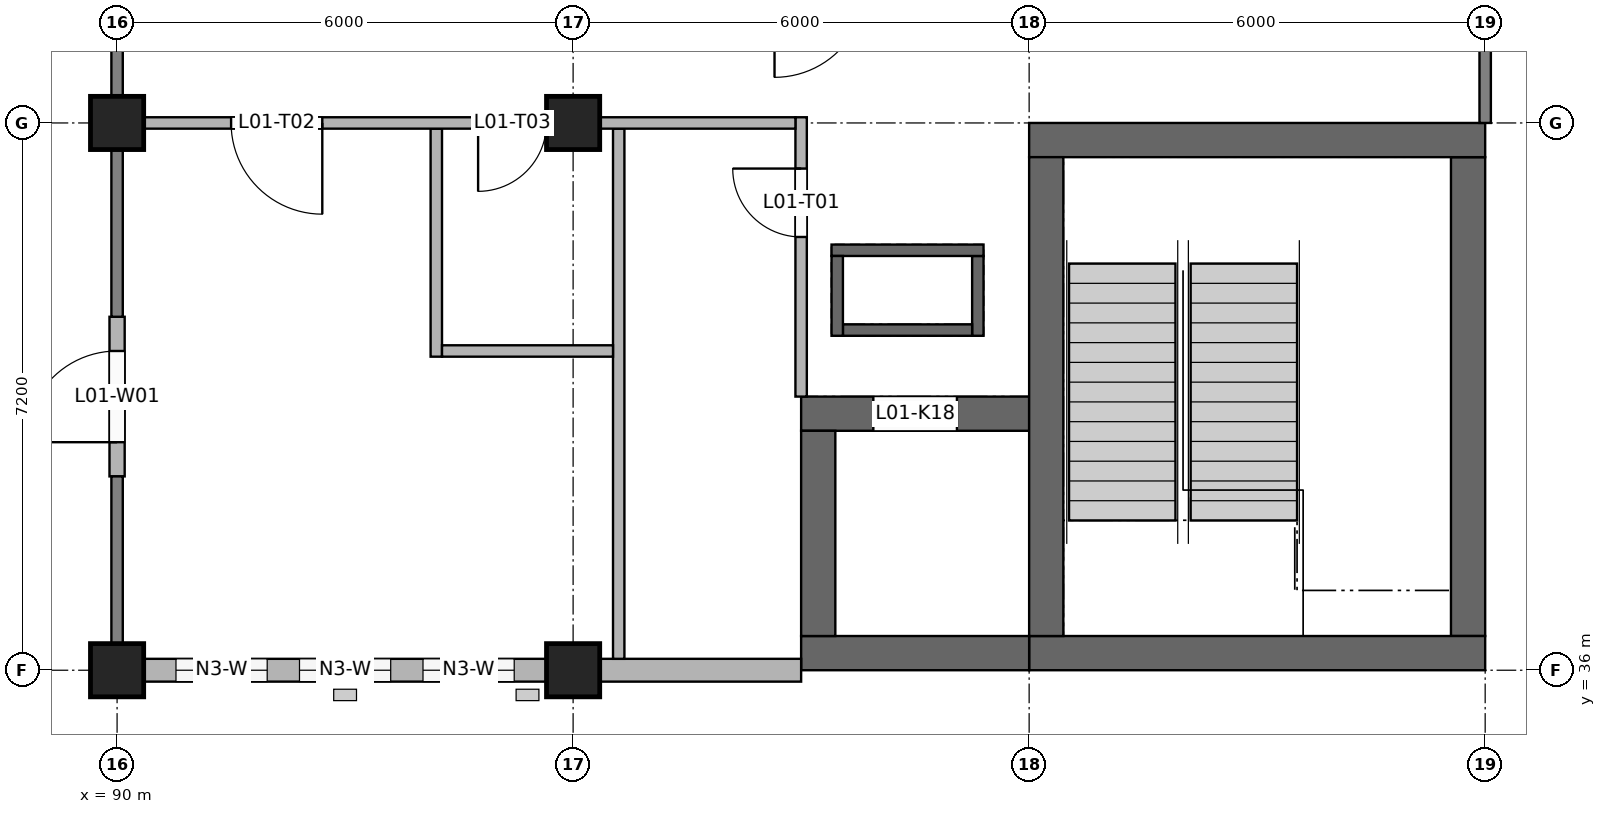
"""IFC4 building model, lengths in metres.
Left out: names, types, materials, properties, quantities, classifications, styles, units other than length and angle.
Written with IfcOpenShell. Run it as: python <this file> out.ifc"""

import sys

from ifc_helpers import new_model, si_unit, direction, frame, frame_2d, origin, origin_2d, place, context, subcontext, project, spatial, rectangle, extrude, element, fill, save


model = new_model("IFC4")
c1 = context("Model", 3, precision=1e-05, world=origin(), true_north=direction((0.0, 1.0)))
c2 = subcontext(c1, "Body", "Model", "MODEL_VIEW")
j1 = project(units=[si_unit("LENGTHUNIT", "METRE"), si_unit("PLANEANGLEUNIT", "RADIAN")], contexts=[c1])
p1 = place(None, origin())
s1 = spatial("IfcSite", under=j1, at=p1, CompositionType="ELEMENT")
p2 = place(p1, origin())
s2 = spatial("IfcBuilding", under=s1, at=p2, CompositionType="ELEMENT")
p3 = place(p2, frame((0.0, 0.0, 4.2)))
s3 = spatial("IfcBuildingStorey", under=s2, at=p3, CompositionType="ELEMENT", Elevation=4.2)
p4 = place(p3, frame((102.0, 36.225, 0.0), z_axis=(0.0, 0.0, 1.0), x_axis=(1.0, 0.0, 0.0)))
e1 = element("IfcWall", 1, at=p4, inside=s3, PredefinedType="SHEAR", context=c2, shape_type="SweptSolid", body=[
    extrude(rectangle(XDim=6.0, YDim=0.45, at=frame_2d((3.0, 0.0))), origin(), (0.0, 0.0, 1.0), 3.95),
])
p5 = place(p3, frame((102.0, 42.975, 0.0), z_axis=(0.0, 0.0, 1.0), x_axis=(1.0, 0.0, 0.0)))
e2 = element("IfcWall", 2, at=p5, inside=s3, PredefinedType="SHEAR", context=c2, shape_type="SweptSolid", body=[
    extrude(rectangle(XDim=6.0, YDim=0.45, at=frame_2d((3.0, 0.0))), origin(), (0.0, 0.0, 1.0), 3.95),
])
p6 = place(p5, frame((2.4, 0.0, 0.0)))
e3 = element("IfcOpeningElement", 3, at=p6, cuts=e2, PredefinedType="OPENING", context=c2, shape_type="SweptSolid", body=[
    extrude(rectangle(XDim=1.2, YDim=2.1, at=frame_2d((0.6, 1.05))), frame((0.0, 0.235, 0.0), z_axis=(0.0, -1.0, 0.0), x_axis=(1.0, 0.0, 0.0)), (0.0, 0.0, 1.0), 0.47),
])
p7 = place(p3, frame((102.225, 36.45, 0.0), z_axis=(0.0, 0.0, 1.0), x_axis=(0.0, 1.0, 0.0)))
e4 = element("IfcWall", 4, at=p7, inside=s3, PredefinedType="SHEAR", context=c2, shape_type="SweptSolid", body=[
    extrude(rectangle(XDim=6.3, YDim=0.45, at=frame_2d((3.15, 0.0))), origin(), (0.0, 0.0, 1.0), 3.95),
])
p8 = place(p3, frame((107.775, 36.45, 0.0), z_axis=(0.0, 0.0, 1.0), x_axis=(0.0, 1.0, 0.0)))
e5 = element("IfcWall", 5, at=p8, inside=s3, PredefinedType="SHEAR", context=c2, shape_type="SweptSolid", body=[
    extrude(rectangle(XDim=6.3, YDim=0.45, at=frame_2d((3.15, 0.0))), origin(), (0.0, 0.0, 1.0), 3.95),
])
p9 = place(p8, frame((1.65, 0.0, 0.0)))
e6 = element("IfcOpeningElement", 6, at=p9, cuts=e5, PredefinedType="OPENING", context=c2, shape_type="SweptSolid", body=[
    extrude(rectangle(XDim=1.4, YDim=2.1, at=frame_2d((0.7, 1.05))), frame((0.0, 0.235, 0.0), z_axis=(0.0, -1.0, 0.0), x_axis=(1.0, 0.0, 0.0)), (0.0, 0.0, 1.0), 0.47),
])
p10 = place(p3, frame((99.0, 36.225, 0.0), z_axis=(0.0, 0.0, 1.0), x_axis=(1.0, 0.0, 0.0)))
e7 = element("IfcWall", 7, at=p10, inside=s3, PredefinedType="SHEAR", context=c2, shape_type="SweptSolid", body=[
    extrude(rectangle(XDim=3.0, YDim=0.45, at=frame_2d((1.5, 0.0))), origin(), (0.0, 0.0, 1.0), 4.2),
])
p11 = place(p3, frame((99.0, 39.375, 0.0), z_axis=(0.0, 0.0, 1.0), x_axis=(1.0, 0.0, 0.0)))
e8 = element("IfcWall", 8, at=p11, inside=s3, PredefinedType="SHEAR", context=c2, shape_type="SweptSolid", body=[
    extrude(rectangle(XDim=3.0, YDim=0.45, at=frame_2d((1.5, 0.0))), origin(), (0.0, 0.0, 1.0), 4.2),
])
p12 = place(p11, frame((0.95, 0.0, 0.0)))
e9 = element("IfcOpeningElement", 9, at=p12, cuts=e8, PredefinedType="OPENING", context=c2, shape_type="SweptSolid", body=[
    extrude(rectangle(XDim=1.1, YDim=2.1, at=frame_2d((0.55, 1.05))), frame((0.0, 0.235, 0.0), z_axis=(0.0, -1.0, 0.0), x_axis=(1.0, 0.0, 0.0)), (0.0, 0.0, 1.0), 0.47),
])
p13 = place(p3, frame((99.225, 36.45, 0.0), z_axis=(0.0, 0.0, 1.0), x_axis=(0.0, 1.0, 0.0)))
e10 = element("IfcWall", 10, at=p13, inside=s3, PredefinedType="SHEAR", context=c2, shape_type="SweptSolid", body=[
    extrude(rectangle(XDim=2.7, YDim=0.45, at=frame_2d((1.35, 0.0))), origin(), (0.0, 0.0, 1.0), 4.2),
])
for number, where, z_axis, x_axis in (
    (11, (102.0, 36.225, -0.2), (0.0, 0.0, 1.0), (1.0, 0.0, 0.0)),
    (12, (102.0, 42.975, -0.2), (0.0, 0.0, 1.0), (1.0, 0.0, 0.0)),
):
    element("IfcWall", number, at=place(p3, frame(where, z_axis=z_axis, x_axis=x_axis)), inside=s3, PredefinedType="SOLIDWALL", context=c2, shape_type="SweptSolid", body=[
        extrude(rectangle(XDim=6.0, YDim=0.45, at=frame_2d((3.0, 0.0))), origin(), (0.0, 0.0, 1.0), 0.2),
    ])
p14 = place(p3, frame((107.775, 36.45, -0.2), z_axis=(0.0, 0.0, 1.0), x_axis=(0.0, 1.0, 0.0)))
e13 = element("IfcWall", 13, at=p14, inside=s3, PredefinedType="SOLIDWALL", context=c2, shape_type="SweptSolid", body=[
    extrude(rectangle(XDim=6.3, YDim=0.45, at=frame_2d((3.15, 0.0))), origin(), (0.0, 0.0, 1.0), 0.2),
])
p15 = place(p3, frame((99.4, 40.475, 0.0), z_axis=(0.0, 0.0, 1.0), x_axis=(1.0, 0.0, 0.0)))
e14 = element("IfcWall", 14, at=p15, inside=s3, PredefinedType="SOLIDWALL", context=c2, shape_type="SweptSolid", body=[
    extrude(rectangle(XDim=2.0, YDim=0.15, at=frame_2d((1.0, 0.0))), origin(), (0.0, 0.0, 1.0), 4.2),
])
p16 = place(p3, frame((99.4, 41.525, 0.0), z_axis=(0.0, 0.0, 1.0), x_axis=(1.0, 0.0, 0.0)))
e15 = element("IfcWall", 15, at=p16, inside=s3, PredefinedType="SOLIDWALL", context=c2, shape_type="SweptSolid", body=[
    extrude(rectangle(XDim=2.0, YDim=0.15, at=frame_2d((1.0, 0.0))), origin(), (0.0, 0.0, 1.0), 4.2),
])
p17 = place(p16, frame((0.6, 0.0, 0.0)))
e16 = element("IfcOpeningElement", 16, at=p17, cuts=e15, PredefinedType="OPENING", context=c2, shape_type="SweptSolid", body=[
    extrude(rectangle(XDim=0.8, YDim=2.1, at=frame_2d((0.4, 1.05))), frame((0.0, 0.085, 0.0), z_axis=(0.0, -1.0, 0.0), x_axis=(1.0, 0.0, 0.0)), (0.0, 0.0, 1.0), 0.17),
])
for number, where, z_axis, x_axis in (
    (17, (99.475, 40.55, 0.0), (0.0, 0.0, 1.0), (0.0, 1.0, 0.0)),
    (18, (101.325, 40.55, 0.0), (0.0, 0.0, 1.0), (0.0, 1.0, 0.0)),
):
    element("IfcWall", number, at=place(p3, frame(where, z_axis=z_axis, x_axis=x_axis)), inside=s3, PredefinedType="SOLIDWALL", context=c2, shape_type="SweptSolid", body=[
        extrude(rectangle(XDim=0.9, YDim=0.15, at=frame_2d((0.45, 0.0))), origin(), (0.0, 0.0, 1.0), 4.2),
    ])
p18 = place(p3, frame((99.55, 40.475, -0.2), z_axis=(0.0, 0.0, 1.0), x_axis=(1.0, 0.0, 0.0)))
e19 = element("IfcWall", 19, at=p18, inside=s3, PredefinedType="SOLIDWALL", context=c2, shape_type="SweptSolid", body=[
    extrude(rectangle(XDim=1.7, YDim=0.15, at=frame_2d((0.85, 0.0))), origin(), (0.0, 0.0, 1.0), 0.2),
])
p19 = place(p3, frame((99.4, 41.525, -0.2), z_axis=(0.0, 0.0, 1.0), x_axis=(1.0, 0.0, 0.0)))
e20 = element("IfcWall", 20, at=p19, inside=s3, PredefinedType="SOLIDWALL", context=c2, shape_type="SweptSolid", body=[
    extrude(rectangle(XDim=2.0, YDim=0.15, at=frame_2d((1.0, 0.0))), origin(), (0.0, 0.0, 1.0), 0.2),
])
for number, where, z_axis, x_axis in (
    (21, (99.475, 40.4, -0.2), (0.0, 0.0, 1.0), (0.0, 1.0, 0.0)),
    (22, (101.325, 40.4, -0.2), (0.0, 0.0, 1.0), (0.0, 1.0, 0.0)),
):
    element("IfcWall", number, at=place(p3, frame(where, z_axis=z_axis, x_axis=x_axis)), inside=s3, PredefinedType="SOLIDWALL", context=c2, shape_type="SweptSolid", body=[
        extrude(rectangle(XDim=1.05, YDim=0.15, at=frame_2d((0.525, 0.0))), origin(), (0.0, 0.0, 1.0), 0.2),
    ])
for number, where, z_axis, x_axis in (
    (23, (90.0, 36.0, 0.0), (0.0, 0.0, 1.0), (1.0, 0.0, 0.0)),
    (24, (96.0, 36.0, 0.0), (0.0, 0.0, 1.0), (1.0, 0.0, 0.0)),
    (25, (90.0, 43.2, 0.0), (0.0, 0.0, 1.0), (1.0, 0.0, 0.0)),
    (26, (96.0, 43.2, 0.0), (0.0, 0.0, 1.0), (1.0, 0.0, 0.0)),
):
    element("IfcColumn", number, at=place(p3, frame(where, z_axis=z_axis, x_axis=x_axis)), inside=s3, PredefinedType="COLUMN", context=c2, shape_type="SweptSolid", body=[
        extrude(rectangle(XDim=0.7, YDim=0.7, at=origin_2d()), origin(), (0.0, 0.0, 1.0), 3.95),
    ])
p20 = place(p3, frame((90.0, 38.55, 0.0), z_axis=(0.0, 0.0, 1.0), x_axis=(0.0, 1.0, 0.0)))
e27 = element("IfcWall", 27, at=p20, inside=s3, PredefinedType="SOLIDWALL", context=c2, shape_type="SweptSolid", body=[
    extrude(rectangle(XDim=2.1, YDim=0.2, at=frame_2d((1.05, 0.0))), origin(), (0.0, 0.0, 1.0), 3.15),
])
p21 = place(p20, frame((0.45, 0.0, 0.0)))
e28 = element("IfcOpeningElement", 28, at=p21, cuts=e27, PredefinedType="OPENING", context=c2, shape_type="SweptSolid", body=[
    extrude(rectangle(XDim=1.2, YDim=2.4, at=frame_2d((0.6, 1.2))), frame((0.0, 0.11, 0.0), z_axis=(0.0, -1.0, 0.0), x_axis=(1.0, 0.0, 0.0)), (0.0, 0.0, 1.0), 0.22),
])
p22 = place(p3, frame((90.35, 36.0, 0.0), z_axis=(0.0, 0.0, 1.0), x_axis=(1.0, 0.0, 0.0)))
e29 = element("IfcWall", 29, at=p22, inside=s3, PredefinedType="SOLIDWALL", context=c2, shape_type="SweptSolid", body=[
    extrude(rectangle(XDim=5.3, YDim=0.3, at=frame_2d((2.65, 0.0))), origin(), (0.0, 0.0, 1.0), 3.25),
])
p23 = place(p22, frame((0.425, 0.0, 0.9)))
e30 = element("IfcOpeningElement", 30, at=p23, cuts=e29, PredefinedType="OPENING", context=c2, shape_type="SweptSolid", body=[
    extrude(rectangle(XDim=1.2, YDim=1.5, at=frame_2d((0.6, 0.75))), frame((0.0, 0.16, 0.0), z_axis=(0.0, -1.0, 0.0), x_axis=(1.0, 0.0, 0.0)), (0.0, 0.0, 1.0), 0.32),
])
p24 = place(p22, frame((2.05, 0.0, 0.9)))
e31 = element("IfcOpeningElement", 31, at=p24, cuts=e29, PredefinedType="OPENING", context=c2, shape_type="SweptSolid", body=[
    extrude(rectangle(XDim=1.2, YDim=1.5, at=frame_2d((0.6, 0.75))), frame((0.0, 0.16, 0.0), z_axis=(0.0, -1.0, 0.0), x_axis=(1.0, 0.0, 0.0)), (0.0, 0.0, 1.0), 0.32),
])
p25 = place(p22, frame((3.675, 0.0, 0.9)))
e32 = element("IfcOpeningElement", 32, at=p25, cuts=e29, PredefinedType="OPENING", context=c2, shape_type="SweptSolid", body=[
    extrude(rectangle(XDim=1.2, YDim=1.5, at=frame_2d((0.6, 0.75))), frame((0.0, 0.16, 0.0), z_axis=(0.0, -1.0, 0.0), x_axis=(1.0, 0.0, 0.0)), (0.0, 0.0, 1.0), 0.32),
])
p26 = place(p3, frame((96.35, 36.0, 0.0), z_axis=(0.0, 0.0, 1.0), x_axis=(1.0, 0.0, 0.0)))
e33 = element("IfcWall", 33, at=p26, inside=s3, PredefinedType="SOLIDWALL", context=c2, shape_type="SweptSolid", body=[
    extrude(rectangle(XDim=2.65, YDim=0.3, at=frame_2d((1.325, 0.0))), origin(), (0.0, 0.0, 1.0), 3.25),
])
p27 = place(p3, frame((94.2, 40.125, 0.0), z_axis=(0.0, 0.0, 1.0), x_axis=(0.0, 1.0, 0.0)))
e34 = element("IfcWall", 34, at=p27, inside=s3, PredefinedType="PARTITIONING", context=c2, shape_type="SweptSolid", body=[
    extrude(rectangle(XDim=3.0, YDim=0.15, at=frame_2d((1.5, 0.0))), origin(), (0.0, 0.0, 1.0), 3.25),
])
p28 = place(p3, frame((96.6, 36.15, 0.0), z_axis=(0.0, 0.0, 1.0), x_axis=(0.0, 1.0, 0.0)))
e35 = element("IfcWall", 35, at=p28, inside=s3, PredefinedType="PARTITIONING", context=c2, shape_type="SweptSolid", body=[
    extrude(rectangle(XDim=6.975, YDim=0.15, at=frame_2d((3.488, 0.0))), origin(), (0.0, 0.0, 1.0), 3.25),
])
p29 = place(p3, frame((99.0, 39.6, 0.0), z_axis=(0.0, 0.0, 1.0), x_axis=(0.0, 1.0, 0.0)))
e36 = element("IfcWall", 36, at=p29, inside=s3, PredefinedType="PARTITIONING", context=c2, shape_type="SweptSolid", body=[
    extrude(rectangle(XDim=3.675, YDim=0.15, at=frame_2d((1.837, 0.0))), origin(), (0.0, 0.0, 1.0), 3.95),
])
p30 = place(p29, frame((2.1, 0.0, 0.0)))
e37 = element("IfcOpeningElement", 37, at=p30, cuts=e36, PredefinedType="OPENING", context=c2, shape_type="SweptSolid", body=[
    extrude(rectangle(XDim=0.9, YDim=2.1, at=frame_2d((0.45, 1.05))), frame((0.0, 0.085, 0.0), z_axis=(0.0, -1.0, 0.0), x_axis=(1.0, 0.0, 0.0)), (0.0, 0.0, 1.0), 0.17),
])
p31 = place(p3, frame((94.275, 40.2, 0.0), z_axis=(0.0, 0.0, 1.0), x_axis=(1.0, 0.0, 0.0)))
e38 = element("IfcWall", 38, at=p31, inside=s3, PredefinedType="PARTITIONING", context=c2, shape_type="SweptSolid", body=[
    extrude(rectangle(XDim=2.25, YDim=0.15, at=frame_2d((1.125, 0.0))), origin(), (0.0, 0.0, 1.0), 3.15),
])
p32 = place(p3, frame((90.15, 43.2, 0.0), z_axis=(0.0, 0.0, 1.0), x_axis=(1.0, 0.0, 0.0)))
e39 = element("IfcWall", 39, at=p32, inside=s3, PredefinedType="PARTITIONING", context=c2, shape_type="SweptSolid", body=[
    extrude(rectangle(XDim=8.775, YDim=0.15, at=frame_2d((4.388, 0.0))), origin(), (0.0, 0.0, 1.0), 3.25),
])
p33 = place(p32, frame((1.35, 0.0, 0.0)))
e40 = element("IfcOpeningElement", 40, at=p33, cuts=e39, PredefinedType="OPENING", context=c2, shape_type="SweptSolid", body=[
    extrude(rectangle(XDim=1.2, YDim=2.1, at=frame_2d((0.6, 1.05))), frame((0.0, 0.085, 0.0), z_axis=(0.0, -1.0, 0.0), x_axis=(1.0, 0.0, 0.0)), (0.0, 0.0, 1.0), 0.17),
])
p34 = place(p32, frame((4.6, 0.0, 0.0)))
e41 = element("IfcOpeningElement", 41, at=p34, cuts=e39, PredefinedType="OPENING", context=c2, shape_type="SweptSolid", body=[
    extrude(rectangle(XDim=0.9, YDim=2.1, at=frame_2d((0.45, 1.05))), frame((0.0, 0.085, 0.0), z_axis=(0.0, -1.0, 0.0), x_axis=(1.0, 0.0, 0.0)), (0.0, 0.0, 1.0), 0.17),
])
p35 = place(p21, origin())
e42 = element("IfcDoor", 42, at=p35, inside=s3, OperationType="SINGLE_SWING_LEFT", PredefinedType="DOOR", context=c2, shape_type="SweptSolid", body=[
    extrude(rectangle(XDim=1.2, YDim=2.4, at=frame_2d((0.6, 1.2))), frame((0.0, 0.025, 0.0), z_axis=(0.0, -1.0, 0.0), x_axis=(1.0, 0.0, 0.0)), (0.0, 0.0, 1.0), 0.05),
])
fill(e28, e42)
p36 = place(p23, origin())
e43 = element("IfcWindow", 43, at=p36, inside=s3, PartitioningType="SINGLE_PANEL", PredefinedType="WINDOW", context=c2, shape_type="SweptSolid", body=[
    extrude(rectangle(XDim=1.2, YDim=1.5, at=frame_2d((0.6, 0.75))), frame((0.0, 0.03, 0.0), z_axis=(0.0, -1.0, 0.0), x_axis=(1.0, 0.0, 0.0)), (0.0, 0.0, 1.0), 0.06),
])
fill(e30, e43)
p37 = place(p24, origin())
e44 = element("IfcWindow", 44, at=p37, inside=s3, PartitioningType="SINGLE_PANEL", PredefinedType="WINDOW", context=c2, shape_type="SweptSolid", body=[
    extrude(rectangle(XDim=1.2, YDim=1.5, at=frame_2d((0.6, 0.75))), frame((0.0, 0.03, 0.0), z_axis=(0.0, -1.0, 0.0), x_axis=(1.0, 0.0, 0.0)), (0.0, 0.0, 1.0), 0.06),
])
fill(e31, e44)
p38 = place(p25, origin())
e45 = element("IfcWindow", 45, at=p38, inside=s3, PartitioningType="SINGLE_PANEL", PredefinedType="WINDOW", context=c2, shape_type="SweptSolid", body=[
    extrude(rectangle(XDim=1.2, YDim=1.5, at=frame_2d((0.6, 0.75))), frame((0.0, 0.03, 0.0), z_axis=(0.0, -1.0, 0.0), x_axis=(1.0, 0.0, 0.0)), (0.0, 0.0, 1.0), 0.06),
])
fill(e32, e45)
p39 = place(p6, frame((1.2, 0.0, 0.0), z_axis=(0.0, 0.0, 1.0), x_axis=(-1.0, 0.0, 0.0)))
e46 = element("IfcDoor", 46, at=p39, inside=s3, OperationType="SINGLE_SWING_RIGHT", PredefinedType="DOOR", context=c2, shape_type="SweptSolid", body=[
    extrude(rectangle(XDim=1.2, YDim=2.1, at=frame_2d((0.6, 1.05))), frame((0.0, 0.025, 0.0), z_axis=(0.0, -1.0, 0.0), x_axis=(1.0, 0.0, 0.0)), (0.0, 0.0, 1.0), 0.05),
])
fill(e3, e46)
p40 = place(p9, frame((1.4, 0.0, 0.0), z_axis=(0.0, 0.0, 1.0), x_axis=(-1.0, 0.0, 0.0)))
e47 = element("IfcDoor", 47, at=p40, inside=s3, OperationType="DOUBLE_DOOR_SINGLE_SWING", PredefinedType="DOOR", context=c2, shape_type="SweptSolid", body=[
    extrude(rectangle(XDim=1.4, YDim=2.1, at=frame_2d((0.7, 1.05))), frame((0.0, 0.025, 0.0), z_axis=(0.0, -1.0, 0.0), x_axis=(1.0, 0.0, 0.0)), (0.0, 0.0, 1.0), 0.05),
])
fill(e6, e47)
p41 = place(p12, origin())
e48 = element("IfcDoor", 48, at=p41, inside=s3, OperationType="DOUBLE_DOOR_SLIDING", PredefinedType="DOOR", context=c2, shape_type="SweptSolid", body=[
    extrude(rectangle(XDim=1.1, YDim=2.1, at=frame_2d((0.55, 1.05))), frame((0.0, 0.025, 0.0), z_axis=(0.0, -1.0, 0.0), x_axis=(1.0, 0.0, 0.0)), (0.0, 0.0, 1.0), 0.05),
])
fill(e9, e48)
p42 = place(p17, origin())
e49 = element("IfcDoor", 49, at=p42, inside=s3, OperationType="SINGLE_SWING_LEFT", PredefinedType="DOOR", context=c2, shape_type="SweptSolid", body=[
    extrude(rectangle(XDim=0.8, YDim=2.1, at=frame_2d((0.4, 1.05))), frame((0.0, 0.025, 0.0), z_axis=(0.0, -1.0, 0.0), x_axis=(1.0, 0.0, 0.0)), (0.0, 0.0, 1.0), 0.05),
])
fill(e16, e49)
p43 = place(p30, origin())
e50 = element("IfcDoor", 50, at=p43, inside=s3, OperationType="SINGLE_SWING_RIGHT", PredefinedType="DOOR", context=c2, shape_type="SweptSolid", body=[
    extrude(rectangle(XDim=0.9, YDim=2.1, at=frame_2d((0.45, 1.05))), frame((0.0, 0.025, 0.0), z_axis=(0.0, -1.0, 0.0), x_axis=(1.0, 0.0, 0.0)), (0.0, 0.0, 1.0), 0.05),
])
fill(e37, e50)
p44 = place(p33, frame((1.2, 0.0, 0.0), z_axis=(0.0, 0.0, 1.0), x_axis=(-1.0, 0.0, 0.0)))
e51 = element("IfcDoor", 51, at=p44, inside=s3, OperationType="SINGLE_SWING_LEFT", PredefinedType="DOOR", context=c2, shape_type="SweptSolid", body=[
    extrude(rectangle(XDim=1.2, YDim=2.1, at=frame_2d((0.6, 1.05))), frame((0.0, 0.025, 0.0), z_axis=(0.0, -1.0, 0.0), x_axis=(1.0, 0.0, 0.0)), (0.0, 0.0, 1.0), 0.05),
])
fill(e40, e51)
p45 = place(p34, frame((0.9, 0.0, 0.0), z_axis=(0.0, 0.0, 1.0), x_axis=(-1.0, 0.0, 0.0)))
e52 = element("IfcDoor", 52, at=p45, inside=s3, OperationType="SINGLE_SWING_RIGHT", PredefinedType="DOOR", context=c2, shape_type="SweptSolid", body=[
    extrude(rectangle(XDim=0.9, YDim=2.1, at=frame_2d((0.45, 1.05))), frame((0.0, 0.025, 0.0), z_axis=(0.0, -1.0, 0.0), x_axis=(1.0, 0.0, 0.0)), (0.0, 0.0, 1.0), 0.05),
])
fill(e41, e52)
save(model, sys.argv[1])
